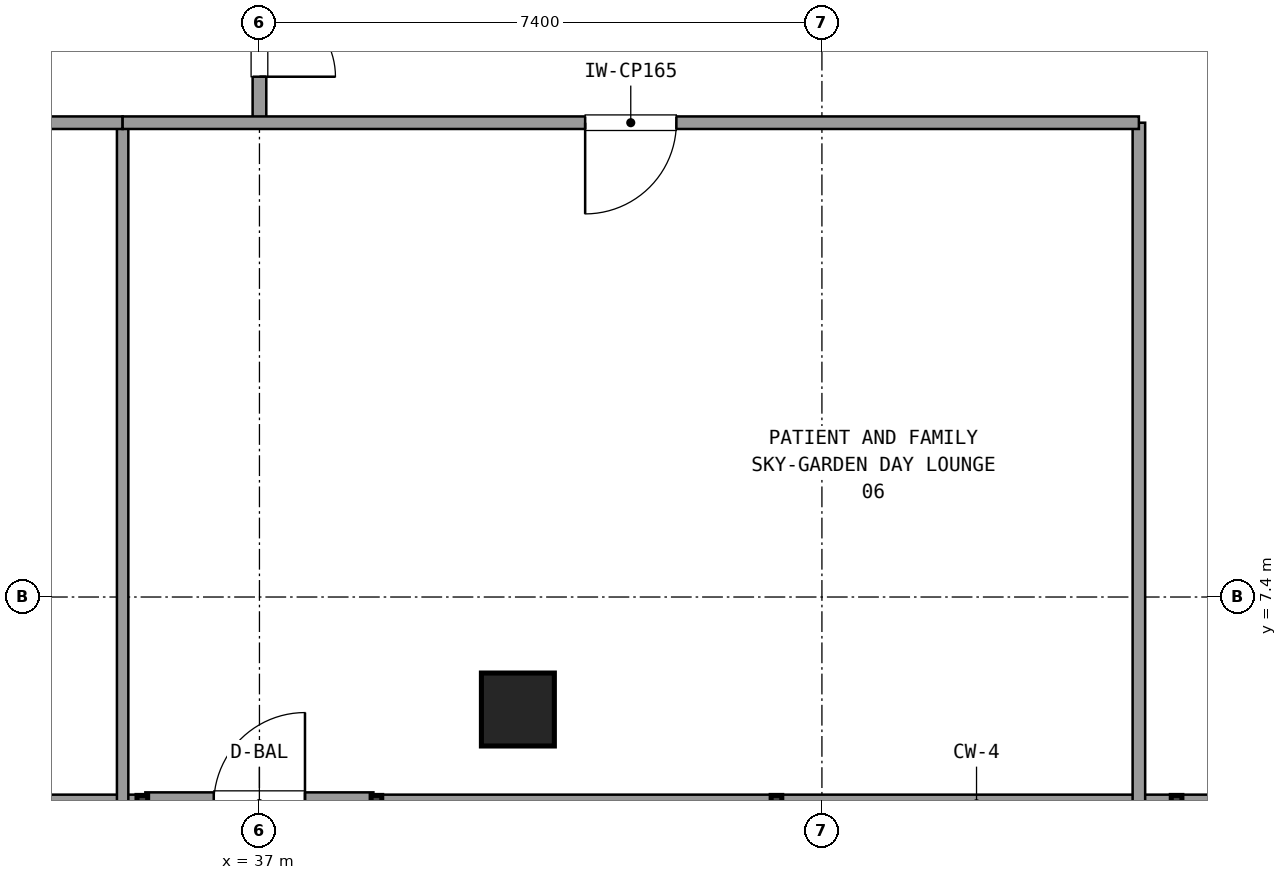
"""IFC4 building model, lengths in metres.
Left out: names, types, materials, properties, quantities, classifications, styles, units other than length and angle.
Written with IfcOpenShell. Run it as: python <this file> out.ifc"""

import sys

from ifc_helpers import new_model, si_unit, direction, frame, frame_2d, origin, origin_2d, place, context, subcontext, project, spatial, rectangle, extrude, element, fill, save


model = new_model("IFC4")
c1 = context("Model", 3, precision=1e-05, world=origin(), true_north=direction((0.0, 1.0)))
c2 = subcontext(c1, "Body", "Model", "MODEL_VIEW")
j1 = project(units=[si_unit("LENGTHUNIT", "METRE"), si_unit("PLANEANGLEUNIT", "RADIAN")], contexts=[c1])
p1 = place(None, origin())
s1 = spatial("IfcSite", under=j1, at=p1, CompositionType="ELEMENT")
p2 = place(p1, origin())
s2 = spatial("IfcBuilding", under=s1, at=p2, CompositionType="ELEMENT")
p3 = place(p2, frame((0.0, 0.0, 167.22)))
s3 = spatial("IfcBuildingStorey", under=s2, at=p3, CompositionType="ELEMENT", Elevation=167.22)
p4 = place(p3, frame((40.4, 5.92, 0.0), z_axis=(0.0, 0.0, 1.0), x_axis=(1.0, 0.0, 0.0)))
e1 = element("IfcColumn", 1, at=p4, inside=s3, PredefinedType="COLUMN", context=c2, shape_type="SweptSolid", body=[
    extrude(rectangle(XDim=0.96, YDim=0.96, at=origin_2d()), origin(), (0.0, 0.0, 1.0), 3.6),
])
p5 = place(p3, frame((35.499, 4.68, 0.0), z_axis=(0.0, 0.0, 1.0), x_axis=(1.0, 0.0, 0.0)))
e2 = element("IfcWall", 2, at=p5, inside=s3, PredefinedType="SOLIDWALL", context=c2, shape_type="SweptSolid", body=[
    extrude(rectangle(XDim=3.0, YDim=0.3, at=frame_2d((1.5, 0.0))), origin(), (0.0, 0.0, 1.0), 2.67),
])
p6 = place(p5, frame((0.9, 0.0, 0.0)))
e3 = element("IfcOpeningElement", 3, at=p6, cuts=e2, PredefinedType="OPENING", context=c2, shape_type="SweptSolid", body=[
    extrude(rectangle(XDim=1.2, YDim=2.2, at=frame_2d((0.6, 1.1))), frame((0.0, 0.16, 0.0), z_axis=(0.0, -1.0, 0.0), x_axis=(1.0, 0.0, 0.0)), (0.0, 0.0, 1.0), 0.32),
])
p7 = place(p3, frame((19.671, 4.68, 0.0), z_axis=(0.0, 0.0, 1.0), x_axis=(1.0, 0.0, 0.0)))
e4 = element("IfcWall", 4, at=p7, inside=s3, PredefinedType="SOLIDWALL", context=c2, shape_type="SweptSolid", body=[
    extrude(rectangle(XDim=15.788, YDim=0.24, at=frame_2d((7.894, 0.0))), origin(), (0.0, 0.0, 1.0), 0.85),
])
p8 = place(p3, frame((38.539, 4.68, 0.0), z_axis=(0.0, 0.0, 1.0), x_axis=(1.0, 0.0, 0.0)))
e5 = element("IfcWall", 5, at=p8, inside=s3, PredefinedType="SOLIDWALL", context=c2, shape_type="SweptSolid", body=[
    extrude(rectangle(XDim=15.79, YDim=0.24, at=frame_2d((7.895, 0.0))), origin(), (0.0, 0.0, 1.0), 0.85),
])
p9 = place(p3, frame((37.0, 13.64, 0.0), z_axis=(0.0, 0.0, 1.0), x_axis=(0.0, 1.0, 0.0)))
e6 = element("IfcWall", 6, at=p9, inside=s3, PredefinedType="PARTITIONING", context=c2, shape_type="SweptSolid", body=[
    extrude(rectangle(XDim=3.21, YDim=0.18, at=frame_2d((1.605, 0.0))), origin(), (0.0, 0.0, 1.0), 2.61),
])
p10 = place(p9, frame((0.605, 0.0, 0.0)))
e7 = element("IfcOpeningElement", 7, at=p10, cuts=e6, PredefinedType="OPENING", context=c2, shape_type="SweptSolid", body=[
    extrude(rectangle(XDim=2.0, YDim=2.2, at=frame_2d((1.0, 1.1))), frame((0.0, 0.1, 0.0), z_axis=(0.0, -1.0, 0.0), x_axis=(1.0, 0.0, 0.0)), (0.0, 0.0, 1.0), 0.2),
])
p11 = place(p3, frame((48.57, 4.7, 0.0), z_axis=(0.0, 0.0, 1.0), x_axis=(0.0, 1.0, 0.0)))
e8 = element("IfcWall", 8, at=p11, inside=s3, PredefinedType="PARTITIONING", context=c2, shape_type="SweptSolid", body=[
    extrude(rectangle(XDim=8.94, YDim=0.165, at=frame_2d((4.47, 0.0))), origin(), (0.0, 0.0, 1.0), 2.61),
])
p12 = place(p3, frame((35.2, 13.64, 0.0), z_axis=(0.0, 0.0, 1.0), x_axis=(0.0, -1.0, 0.0)))
e9 = element("IfcWall", 9, at=p12, inside=s3, PredefinedType="PARTITIONING", context=c2, shape_type="SweptSolid", body=[
    extrude(rectangle(XDim=8.94, YDim=0.15, at=frame_2d((4.47, 0.0))), origin(), (0.0, 0.0, 1.0), 2.61),
])
p13 = place(p3, frame((25.43, 13.64, 0.0), z_axis=(0.0, 0.0, 1.0), x_axis=(1.0, 0.0, 0.0)))
e10 = element("IfcWall", 10, at=p13, inside=s3, PredefinedType="PARTITIONING", context=c2, shape_type="SweptSolid", body=[
    extrude(rectangle(XDim=9.77, YDim=0.165, at=frame_2d((4.885, 0.0))), origin(), (0.0, 0.0, 1.0), 2.61),
])
p14 = place(p13, frame((4.285, 0.0, 0.0)))
e11 = element("IfcOpeningElement", 11, at=p14, cuts=e10, PredefinedType="OPENING", context=c2, shape_type="SweptSolid", body=[
    extrude(rectangle(XDim=1.2, YDim=2.15, at=frame_2d((0.6, 1.075))), frame((0.0, 0.093, 0.0), z_axis=(0.0, -1.0, 0.0), x_axis=(1.0, 0.0, 0.0)), (0.0, 0.0, 1.0), 0.185),
])
p15 = place(p3, frame((35.2, 13.64, 0.0), z_axis=(0.0, 0.0, 1.0), x_axis=(1.0, 0.0, 0.0)))
e12 = element("IfcWall", 12, at=p15, inside=s3, PredefinedType="PARTITIONING", context=c2, shape_type="SweptSolid", body=[
    extrude(rectangle(XDim=13.37, YDim=0.165, at=frame_2d((6.685, 0.0))), origin(), (0.0, 0.0, 1.0), 2.61),
])
p16 = place(p15, frame((6.085, 0.0, 0.0)))
e13 = element("IfcOpeningElement", 13, at=p16, cuts=e12, PredefinedType="OPENING", context=c2, shape_type="SweptSolid", body=[
    extrude(rectangle(XDim=1.2, YDim=2.15, at=frame_2d((0.6, 1.075))), frame((0.0, 0.093, 0.0), z_axis=(0.0, -1.0, 0.0), x_axis=(1.0, 0.0, 0.0)), (0.0, 0.0, 1.0), 0.185),
])
p17 = place(p10, frame((2.0, 0.0, 0.0), z_axis=(0.0, 0.0, 1.0), x_axis=(-1.0, 0.0, 0.0)))
e14 = element("IfcDoor", 14, at=p17, inside=s3, OperationType="DOUBLE_DOOR_SINGLE_SWING", PredefinedType="DOOR", context=c2, shape_type="SweptSolid", body=[
    extrude(rectangle(XDim=2.0, YDim=2.2, at=frame_2d((1.0, 1.1))), frame((0.0, 0.025, 0.0), z_axis=(0.0, -1.0, 0.0), x_axis=(1.0, 0.0, 0.0)), (0.0, 0.0, 1.0), 0.05),
])
fill(e7, e14)
p18 = place(p16, frame((1.2, 0.0, 0.0), z_axis=(0.0, 0.0, 1.0), x_axis=(-1.0, 0.0, 0.0)))
e15 = element("IfcDoor", 15, at=p18, inside=s3, OperationType="SINGLE_SWING_LEFT", PredefinedType="DOOR", context=c2, shape_type="SweptSolid", body=[
    extrude(rectangle(XDim=1.2, YDim=2.15, at=frame_2d((0.6, 1.075))), frame((0.0, 0.025, 0.0), z_axis=(0.0, -1.0, 0.0), x_axis=(1.0, 0.0, 0.0)), (0.0, 0.0, 1.0), 0.05),
])
fill(e13, e15)
save(model, sys.argv[1])
